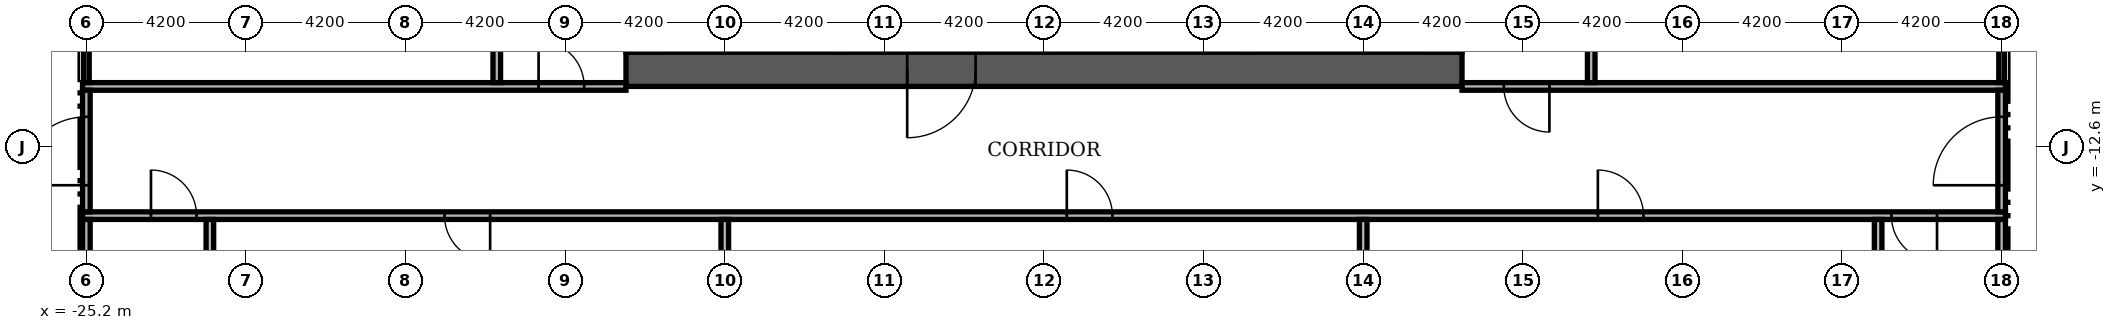
"""IFC4 building model, lengths in metres.
Left out: names, types, materials, properties, quantities, classifications, styles, units other than length and angle.
Written with IfcOpenShell. Run it as: python <this file> out.ifc"""

import sys

from ifc_helpers import new_model, si_unit, direction, frame, frame_2d, origin, place, context, subcontext, project, spatial, rectangle, extrude, element, fill, save


model = new_model("IFC4")
c1 = context("Model", 3, precision=1e-05, world=origin(), true_north=direction((0.0, 1.0)))
c2 = subcontext(c1, "Body", "Model", "MODEL_VIEW")
j1 = project(units=[si_unit("LENGTHUNIT", "METRE"), si_unit("PLANEANGLEUNIT", "RADIAN")], contexts=[c1])
p1 = place(None, origin())
s1 = spatial("IfcSite", under=j1, at=p1, CompositionType="ELEMENT")
p2 = place(p1, origin())
s2 = spatial("IfcBuilding", under=s1, at=p2, CompositionType="ELEMENT")
p3 = place(p2, frame((0.0, 0.0, -8.4)))
s3 = spatial("IfcBuildingStorey", under=s2, at=p3, CompositionType="ELEMENT", Elevation=-8.4)
p4 = place(p3, frame((-11.0, -10.55, 0.0), z_axis=(0.0, 0.0, 1.0), x_axis=(1.0, 0.0, 0.0)))
e1 = element("IfcWall", 1, at=p4, inside=s3, PredefinedType="SHEAR", context=c2, shape_type="SweptSolid", body=[
    extrude(rectangle(XDim=22.0, YDim=0.9, at=frame_2d((11.0, 0.0))), origin(), (0.0, 0.0, 1.0), 3.85),
])
p5 = place(p4, frame((7.4, 0.0, 0.0)))
e2 = element("IfcOpeningElement", 2, at=p5, cuts=e1, PredefinedType="OPENING", context=c2, shape_type="SweptSolid", body=[
    extrude(rectangle(XDim=1.8, YDim=2.2, at=frame_2d((0.9, 1.1))), frame((0.0, 0.46, 0.0), z_axis=(0.0, -1.0, 0.0), x_axis=(1.0, 0.0, 0.0)), (0.0, 0.0, 1.0), 0.92),
])
p6 = place(p3, frame((-25.3, -14.4, 0.0), z_axis=(0.0, 0.0, 1.0), x_axis=(1.0, 0.0, 0.0)))
e3 = element("IfcWall", 3, at=p6, inside=s3, PredefinedType="PARTITIONING", context=c2, shape_type="SweptSolid", body=[
    extrude(rectangle(XDim=50.6, YDim=0.2, at=frame_2d((25.3, 0.0))), origin(), (0.0, 0.0, 1.0), 3.85),
])
p7 = place(p6, frame((1.8, 0.0, 0.0)))
e4 = element("IfcOpeningElement", 4, at=p7, cuts=e3, PredefinedType="OPENING", context=c2, shape_type="SweptSolid", body=[
    extrude(rectangle(XDim=1.2, YDim=2.2, at=frame_2d((0.6, 1.1))), frame((0.0, 0.11, 0.0), z_axis=(0.0, -1.0, 0.0), x_axis=(1.0, 0.0, 0.0)), (0.0, 0.0, 1.0), 0.22),
])
p8 = place(p6, frame((9.525, 0.0, 0.0)))
e5 = element("IfcOpeningElement", 5, at=p8, cuts=e3, PredefinedType="OPENING", context=c2, shape_type="SweptSolid", body=[
    extrude(rectangle(XDim=1.2, YDim=2.2, at=frame_2d((0.6, 1.1))), frame((0.0, 0.11, 0.0), z_axis=(0.0, -1.0, 0.0), x_axis=(1.0, 0.0, 0.0)), (0.0, 0.0, 1.0), 0.22),
])
p9 = place(p6, frame((25.9, 0.0, 0.0)))
e6 = element("IfcOpeningElement", 6, at=p9, cuts=e3, PredefinedType="OPENING", context=c2, shape_type="SweptSolid", body=[
    extrude(rectangle(XDim=1.2, YDim=2.2, at=frame_2d((0.6, 1.1))), frame((0.0, 0.11, 0.0), z_axis=(0.0, -1.0, 0.0), x_axis=(1.0, 0.0, 0.0)), (0.0, 0.0, 1.0), 0.22),
])
p10 = place(p6, frame((39.875, 0.0, 0.0)))
e7 = element("IfcOpeningElement", 7, at=p10, cuts=e3, PredefinedType="OPENING", context=c2, shape_type="SweptSolid", body=[
    extrude(rectangle(XDim=1.2, YDim=2.2, at=frame_2d((0.6, 1.1))), frame((0.0, 0.11, 0.0), z_axis=(0.0, -1.0, 0.0), x_axis=(1.0, 0.0, 0.0)), (0.0, 0.0, 1.0), 0.22),
])
p11 = place(p6, frame((47.6, 0.0, 0.0)))
e8 = element("IfcOpeningElement", 8, at=p11, cuts=e3, PredefinedType="OPENING", context=c2, shape_type="SweptSolid", body=[
    extrude(rectangle(XDim=1.2, YDim=2.2, at=frame_2d((0.6, 1.1))), frame((0.0, 0.11, 0.0), z_axis=(0.0, -1.0, 0.0), x_axis=(1.0, 0.0, 0.0)), (0.0, 0.0, 1.0), 0.22),
])
p12 = place(p3, frame((-25.3, -11.0, 0.0), z_axis=(0.0, 0.0, 1.0), x_axis=(1.0, 0.0, 0.0)))
e9 = element("IfcWall", 9, at=p12, inside=s3, PredefinedType="PARTITIONING", context=c2, shape_type="SweptSolid", body=[
    extrude(rectangle(XDim=14.3, YDim=0.2, at=frame_2d((7.15, 0.0))), origin(), (0.0, 0.0, 1.0), 3.85),
])
p13 = place(p12, frame((12.0, 0.0, 0.0)))
e10 = element("IfcOpeningElement", 10, at=p13, cuts=e9, PredefinedType="OPENING", context=c2, shape_type="SweptSolid", body=[
    extrude(rectangle(XDim=1.2, YDim=2.2, at=frame_2d((0.6, 1.1))), frame((0.0, 0.11, 0.0), z_axis=(0.0, -1.0, 0.0), x_axis=(1.0, 0.0, 0.0)), (0.0, 0.0, 1.0), 0.22),
])
p14 = place(p3, frame((11.0, -11.0, 0.0), z_axis=(0.0, 0.0, 1.0), x_axis=(1.0, 0.0, 0.0)))
e11 = element("IfcWall", 11, at=p14, inside=s3, PredefinedType="PARTITIONING", context=c2, shape_type="SweptSolid", body=[
    extrude(rectangle(XDim=14.3, YDim=0.2, at=frame_2d((7.15, 0.0))), origin(), (0.0, 0.0, 1.0), 3.85),
])
p15 = place(p14, frame((1.1, 0.0, 0.0)))
e12 = element("IfcOpeningElement", 12, at=p15, cuts=e11, PredefinedType="OPENING", context=c2, shape_type="SweptSolid", body=[
    extrude(rectangle(XDim=1.2, YDim=2.2, at=frame_2d((0.6, 1.1))), frame((0.0, 0.11, 0.0), z_axis=(0.0, -1.0, 0.0), x_axis=(1.0, 0.0, 0.0)), (0.0, 0.0, 1.0), 0.22),
])
p16 = place(p3, frame((-25.2, -16.2, 0.0), z_axis=(0.0, 0.0, 1.0), x_axis=(0.0, 1.0, 0.0)))
e13 = element("IfcWall", 13, at=p16, inside=s3, PredefinedType="PARTITIONING", context=c2, shape_type="SweptSolid", body=[
    extrude(rectangle(XDim=1.7, YDim=0.2, at=frame_2d((0.85, 0.0))), origin(), (0.0, 0.0, 1.0), 3.85),
])
p17 = place(p3, frame((-25.2, -14.3, 0.0), z_axis=(0.0, 0.0, 1.0), x_axis=(0.0, 1.0, 0.0)))
e14 = element("IfcWall", 14, at=p17, inside=s3, PredefinedType="PARTITIONING", context=c2, shape_type="SweptSolid", body=[
    extrude(rectangle(XDim=3.2, YDim=0.2, at=frame_2d((1.6, 0.0))), origin(), (0.0, 0.0, 1.0), 3.85),
])
p18 = place(p17, frame((0.7, 0.0, 0.0)))
e15 = element("IfcOpeningElement", 15, at=p18, cuts=e14, PredefinedType="OPENING", context=c2, shape_type="SweptSolid", body=[
    extrude(rectangle(XDim=1.8, YDim=2.2, at=frame_2d((0.9, 1.1))), frame((0.0, 0.11, 0.0), z_axis=(0.0, -1.0, 0.0), x_axis=(1.0, 0.0, 0.0)), (0.0, 0.0, 1.0), 0.22),
])
p19 = place(p3, frame((-25.2, -10.9, 0.0), z_axis=(0.0, 0.0, 1.0), x_axis=(0.0, 1.0, 0.0)))
e16 = element("IfcWall", 16, at=p19, inside=s3, PredefinedType="PARTITIONING", context=c2, shape_type="SweptSolid", body=[
    extrude(rectangle(XDim=1.9, YDim=0.15, at=frame_2d((0.95, 0.0))), origin(), (0.0, 0.0, 1.0), 3.85),
])
p20 = place(p3, frame((-21.95, -18.5, 0.0), z_axis=(0.0, 0.0, 1.0), x_axis=(0.0, 1.0, 0.0)))
e17 = element("IfcWall", 17, at=p20, inside=s3, PredefinedType="PARTITIONING", context=c2, shape_type="SweptSolid", body=[
    extrude(rectangle(XDim=4.0, YDim=0.2, at=frame_2d((2.0, 0.0))), origin(), (0.0, 0.0, 1.0), 3.85),
])
p21 = place(p3, frame((-14.4, -10.9, 0.0), z_axis=(0.0, 0.0, 1.0), x_axis=(0.0, 1.0, 0.0)))
e18 = element("IfcWall", 18, at=p21, inside=s3, PredefinedType="PARTITIONING", context=c2, shape_type="SweptSolid", body=[
    extrude(rectangle(XDim=21.8, YDim=0.2, at=frame_2d((10.9, 0.0))), origin(), (0.0, 0.0, 1.0), 3.85),
])
p22 = place(p21, frame((4.8, 0.0, 0.0)))
e19 = element("IfcOpeningElement", 19, at=p22, cuts=e18, PredefinedType="OPENING", context=c2, shape_type="SweptSolid", body=[
    extrude(rectangle(XDim=1.2, YDim=2.2, at=frame_2d((0.6, 1.1))), frame((0.0, 0.11, 0.0), z_axis=(0.0, -1.0, 0.0), x_axis=(1.0, 0.0, 0.0)), (0.0, 0.0, 1.0), 0.22),
])
p23 = place(p21, frame((15.8, 0.0, 0.0)))
e20 = element("IfcOpeningElement", 20, at=p23, cuts=e18, PredefinedType="OPENING", context=c2, shape_type="SweptSolid", body=[
    extrude(rectangle(XDim=1.2, YDim=2.2, at=frame_2d((0.6, 1.1))), frame((0.0, 0.11, 0.0), z_axis=(0.0, -1.0, 0.0), x_axis=(1.0, 0.0, 0.0)), (0.0, 0.0, 1.0), 0.22),
])
for number, where, z_axis, x_axis in (
    (21, (-8.4, -16.2, 0.0), (0.0, 0.0, 1.0), (0.0, 1.0, 0.0)),
    (22, (8.4, -16.2, 0.0), (0.0, 0.0, 1.0), (0.0, 1.0, 0.0)),
):
    element("IfcWall", number, at=place(p3, frame(where, z_axis=z_axis, x_axis=x_axis)), inside=s3, PredefinedType="PARTITIONING", context=c2, shape_type="SweptSolid", body=[
        extrude(rectangle(XDim=1.7, YDim=0.2, at=frame_2d((0.85, 0.0))), origin(), (0.0, 0.0, 1.0), 3.85),
    ])
p24 = place(p3, frame((14.4, -10.9, 0.0), z_axis=(0.0, 0.0, 1.0), x_axis=(0.0, 1.0, 0.0)))
e23 = element("IfcWall", 23, at=p24, inside=s3, PredefinedType="PARTITIONING", context=c2, shape_type="SweptSolid", body=[
    extrude(rectangle(XDim=21.8, YDim=0.2, at=frame_2d((10.9, 0.0))), origin(), (0.0, 0.0, 1.0), 3.85),
])
p25 = place(p24, frame((4.8, 0.0, 0.0)))
e24 = element("IfcOpeningElement", 24, at=p25, cuts=e23, PredefinedType="OPENING", context=c2, shape_type="SweptSolid", body=[
    extrude(rectangle(XDim=1.2, YDim=2.2, at=frame_2d((0.6, 1.1))), frame((0.0, 0.11, 0.0), z_axis=(0.0, -1.0, 0.0), x_axis=(1.0, 0.0, 0.0)), (0.0, 0.0, 1.0), 0.22),
])
p26 = place(p24, frame((15.8, 0.0, 0.0)))
e25 = element("IfcOpeningElement", 25, at=p26, cuts=e23, PredefinedType="OPENING", context=c2, shape_type="SweptSolid", body=[
    extrude(rectangle(XDim=1.2, YDim=2.2, at=frame_2d((0.6, 1.1))), frame((0.0, 0.11, 0.0), z_axis=(0.0, -1.0, 0.0), x_axis=(1.0, 0.0, 0.0)), (0.0, 0.0, 1.0), 0.22),
])
p27 = place(p3, frame((21.95, -18.5, 0.0), z_axis=(0.0, 0.0, 1.0), x_axis=(0.0, 1.0, 0.0)))
e26 = element("IfcWall", 26, at=p27, inside=s3, PredefinedType="PARTITIONING", context=c2, shape_type="SweptSolid", body=[
    extrude(rectangle(XDim=4.0, YDim=0.2, at=frame_2d((2.0, 0.0))), origin(), (0.0, 0.0, 1.0), 3.85),
])
p28 = place(p3, frame((25.2, -16.2, 0.0), z_axis=(0.0, 0.0, 1.0), x_axis=(0.0, 1.0, 0.0)))
e27 = element("IfcWall", 27, at=p28, inside=s3, PredefinedType="PARTITIONING", context=c2, shape_type="SweptSolid", body=[
    extrude(rectangle(XDim=1.7, YDim=0.2, at=frame_2d((0.85, 0.0))), origin(), (0.0, 0.0, 1.0), 3.85),
])
p29 = place(p3, frame((25.2, -14.3, 0.0), z_axis=(0.0, 0.0, 1.0), x_axis=(0.0, 1.0, 0.0)))
e28 = element("IfcWall", 28, at=p29, inside=s3, PredefinedType="PARTITIONING", context=c2, shape_type="SweptSolid", body=[
    extrude(rectangle(XDim=3.2, YDim=0.2, at=frame_2d((1.6, 0.0))), origin(), (0.0, 0.0, 1.0), 3.85),
])
p30 = place(p29, frame((0.7, 0.0, 0.0)))
e29 = element("IfcOpeningElement", 29, at=p30, cuts=e28, PredefinedType="OPENING", context=c2, shape_type="SweptSolid", body=[
    extrude(rectangle(XDim=1.8, YDim=2.2, at=frame_2d((0.9, 1.1))), frame((0.0, 0.11, 0.0), z_axis=(0.0, -1.0, 0.0), x_axis=(1.0, 0.0, 0.0)), (0.0, 0.0, 1.0), 0.22),
])
p31 = place(p3, frame((25.2, -10.9, 0.0), z_axis=(0.0, 0.0, 1.0), x_axis=(0.0, 1.0, 0.0)))
e30 = element("IfcWall", 30, at=p31, inside=s3, PredefinedType="PARTITIONING", context=c2, shape_type="SweptSolid", body=[
    extrude(rectangle(XDim=1.9, YDim=0.15, at=frame_2d((0.95, 0.0))), origin(), (0.0, 0.0, 1.0), 3.85),
])
p32 = place(p5, frame((1.8, 0.0, 0.0), z_axis=(0.0, 0.0, 1.0), x_axis=(-1.0, 0.0, 0.0)))
e31 = element("IfcDoor", 31, at=p32, inside=s3, OperationType="DOUBLE_DOOR_SINGLE_SWING", PredefinedType="DOOR", context=c2, shape_type="SweptSolid", body=[
    extrude(rectangle(XDim=1.8, YDim=2.2, at=frame_2d((0.9, 1.1))), frame((0.0, 0.025, 0.0), z_axis=(0.0, -1.0, 0.0), x_axis=(1.0, 0.0, 0.0)), (0.0, 0.0, 1.0), 0.05),
])
fill(e2, e31)
p33 = place(p7, origin())
e32 = element("IfcDoor", 32, at=p33, inside=s3, OperationType="SINGLE_SWING_LEFT", PredefinedType="DOOR", context=c2, shape_type="SweptSolid", body=[
    extrude(rectangle(XDim=1.2, YDim=2.2, at=frame_2d((0.6, 1.1))), frame((0.0, 0.025, 0.0), z_axis=(0.0, -1.0, 0.0), x_axis=(1.0, 0.0, 0.0)), (0.0, 0.0, 1.0), 0.05),
])
fill(e4, e32)
p34 = place(p8, origin())
e33 = element("IfcDoor", 33, at=p34, inside=s3, OperationType="SINGLE_SWING_RIGHT", PredefinedType="DOOR", context=c2, shape_type="SweptSolid", body=[
    extrude(rectangle(XDim=1.2, YDim=2.2, at=frame_2d((0.6, 1.1))), frame((0.0, 0.025, 0.0), z_axis=(0.0, -1.0, 0.0), x_axis=(1.0, 0.0, 0.0)), (0.0, 0.0, 1.0), 0.05),
])
fill(e5, e33)
p35 = place(p9, origin())
e34 = element("IfcDoor", 34, at=p35, inside=s3, OperationType="SINGLE_SWING_LEFT", PredefinedType="DOOR", context=c2, shape_type="SweptSolid", body=[
    extrude(rectangle(XDim=1.2, YDim=2.2, at=frame_2d((0.6, 1.1))), frame((0.0, 0.025, 0.0), z_axis=(0.0, -1.0, 0.0), x_axis=(1.0, 0.0, 0.0)), (0.0, 0.0, 1.0), 0.05),
])
fill(e6, e34)
p36 = place(p10, origin())
e35 = element("IfcDoor", 35, at=p36, inside=s3, OperationType="SINGLE_SWING_LEFT", PredefinedType="DOOR", context=c2, shape_type="SweptSolid", body=[
    extrude(rectangle(XDim=1.2, YDim=2.2, at=frame_2d((0.6, 1.1))), frame((0.0, 0.025, 0.0), z_axis=(0.0, -1.0, 0.0), x_axis=(1.0, 0.0, 0.0)), (0.0, 0.0, 1.0), 0.05),
])
fill(e7, e35)
p37 = place(p11, origin())
e36 = element("IfcDoor", 36, at=p37, inside=s3, OperationType="SINGLE_SWING_RIGHT", PredefinedType="DOOR", context=c2, shape_type="SweptSolid", body=[
    extrude(rectangle(XDim=1.2, YDim=2.2, at=frame_2d((0.6, 1.1))), frame((0.0, 0.025, 0.0), z_axis=(0.0, -1.0, 0.0), x_axis=(1.0, 0.0, 0.0)), (0.0, 0.0, 1.0), 0.05),
])
fill(e8, e36)
p38 = place(p18, origin())
e37 = element("IfcDoor", 37, at=p38, inside=s3, OperationType="DOUBLE_DOOR_SINGLE_SWING", PredefinedType="DOOR", context=c2, shape_type="SweptSolid", body=[
    extrude(rectangle(XDim=1.8, YDim=2.2, at=frame_2d((0.9, 1.1))), frame((0.0, 0.025, 0.0), z_axis=(0.0, -1.0, 0.0), x_axis=(1.0, 0.0, 0.0)), (0.0, 0.0, 1.0), 0.05),
])
fill(e15, e37)
p39 = place(p30, origin())
e38 = element("IfcDoor", 38, at=p39, inside=s3, OperationType="DOUBLE_DOOR_SINGLE_SWING", PredefinedType="DOOR", context=c2, shape_type="SweptSolid", body=[
    extrude(rectangle(XDim=1.8, YDim=2.2, at=frame_2d((0.9, 1.1))), frame((0.0, 0.025, 0.0), z_axis=(0.0, -1.0, 0.0), x_axis=(1.0, 0.0, 0.0)), (0.0, 0.0, 1.0), 0.05),
])
fill(e29, e38)
p40 = place(p13, origin())
e39 = element("IfcDoor", 39, at=p40, inside=s3, OperationType="SINGLE_SWING_LEFT", PredefinedType="DOOR", context=c2, shape_type="SweptSolid", body=[
    extrude(rectangle(XDim=1.2, YDim=2.2, at=frame_2d((0.6, 1.1))), frame((0.0, 0.025, 0.0), z_axis=(0.0, -1.0, 0.0), x_axis=(1.0, 0.0, 0.0)), (0.0, 0.0, 1.0), 0.05),
])
fill(e10, e39)
p41 = place(p15, origin())
e40 = element("IfcDoor", 40, at=p41, inside=s3, OperationType="SINGLE_SWING_RIGHT", PredefinedType="DOOR", context=c2, shape_type="SweptSolid", body=[
    extrude(rectangle(XDim=1.2, YDim=2.2, at=frame_2d((0.6, 1.1))), frame((0.0, 0.025, 0.0), z_axis=(0.0, -1.0, 0.0), x_axis=(1.0, 0.0, 0.0)), (0.0, 0.0, 1.0), 0.05),
])
fill(e12, e40)
save(model, sys.argv[1])
